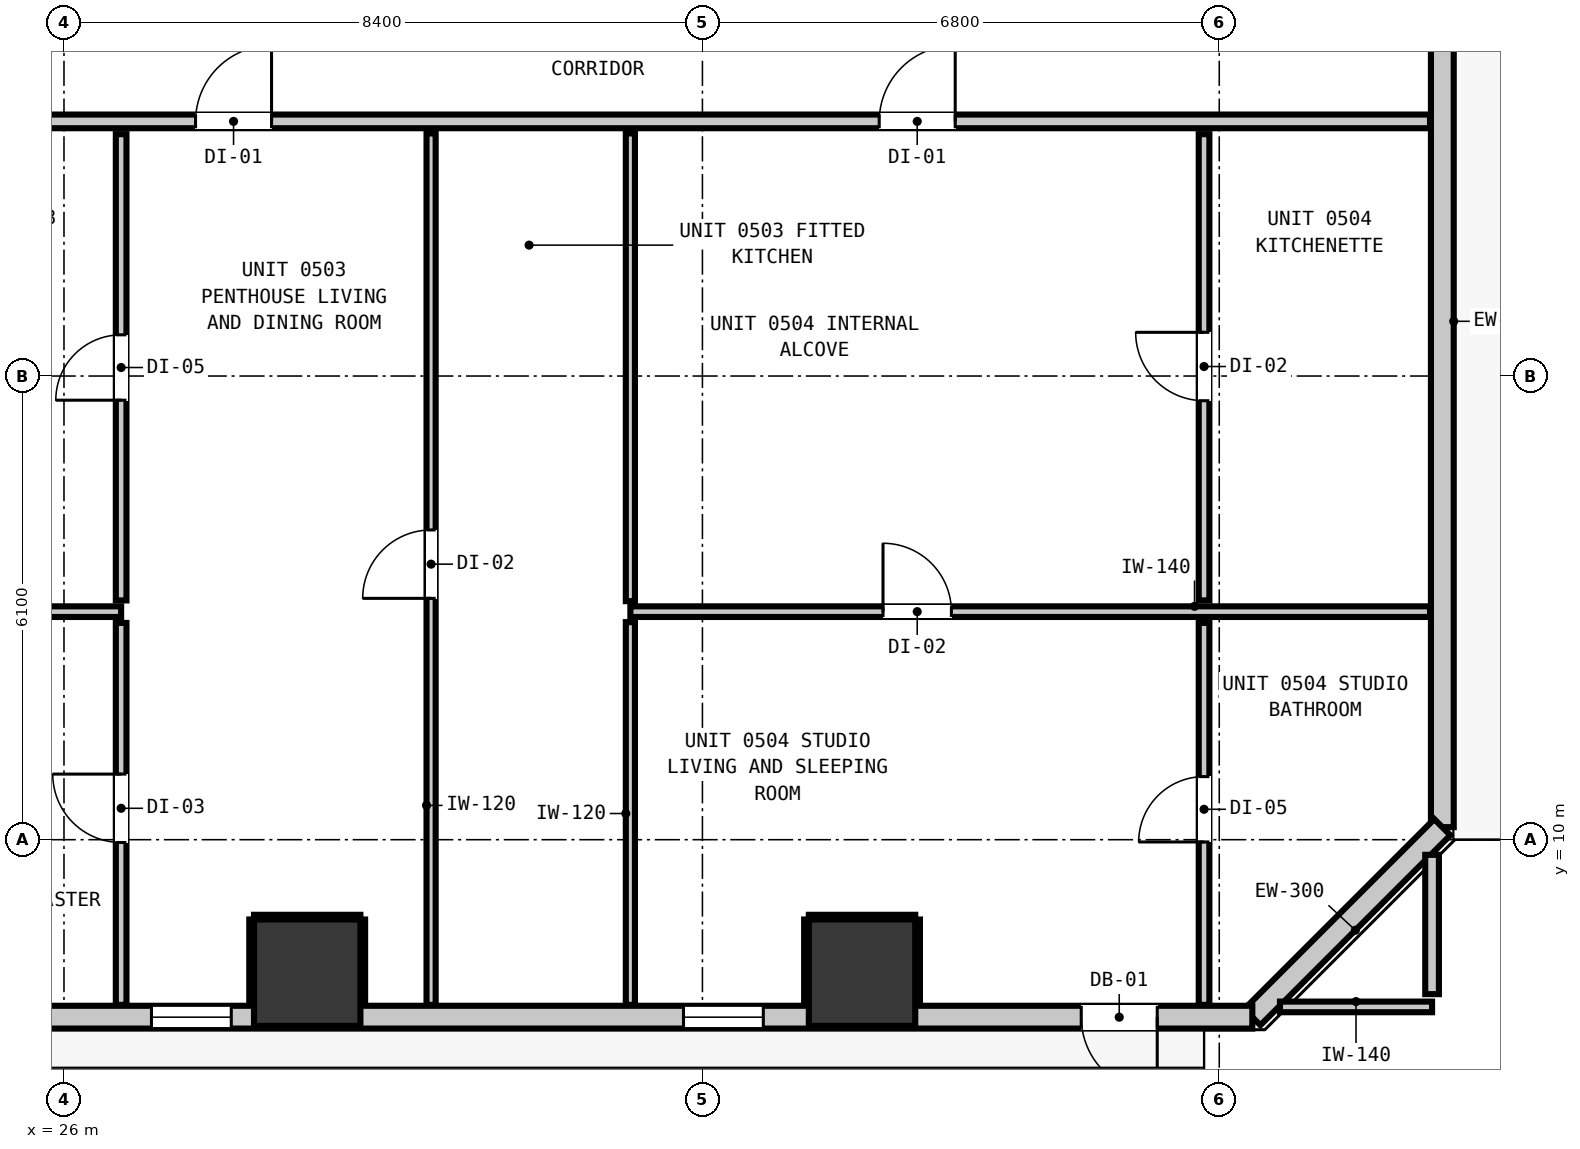
"""IFC4 building model, lengths in metres.
Left out: names, types, materials, properties, quantities, classifications, styles, units other than length and angle.
Written with IfcOpenShell. Run it as: python <this file> out.ifc"""

import sys

from ifc_helpers import new_model, si_unit, direction, frame, frame_2d, origin, origin_2d, place, context, subcontext, project, spatial, rectangle, extrude, element, fill, save


model = new_model("IFC4")
c1 = context("Model", 3, precision=1e-05, world=origin(), true_north=direction((0.0, 1.0)))
c2 = subcontext(c1, "Body", "Model", "MODEL_VIEW")
j1 = project(units=[si_unit("LENGTHUNIT", "METRE"), si_unit("PLANEANGLEUNIT", "RADIAN")], contexts=[c1])
p1 = place(None, origin())
s1 = spatial("IfcSite", under=j1, at=p1, CompositionType="ELEMENT")
p2 = place(p1, origin())
s2 = spatial("IfcBuilding", under=s1, at=p2, CompositionType="ELEMENT")
p3 = place(p2, frame((0.0, 0.0, 22.0)))
s3 = spatial("IfcBuildingStorey", under=s2, at=p3, CompositionType="ELEMENT", Elevation=22.0)
for number, where, z_axis, x_axis in (
    (1, (29.2, 8.25, -0.2), (0.0, 0.0, 1.0), (1.0, 0.0, 0.0)),
    (2, (36.5, 8.25, -0.2), (0.0, 0.0, 1.0), (1.0, 0.0, 0.0)),
):
    element("IfcColumn", number, at=place(p3, frame(where, z_axis=z_axis, x_axis=x_axis)), inside=s3, PredefinedType="COLUMN", context=c2, shape_type="SweptSolid", body=[
        extrude(rectangle(XDim=1.4, YDim=1.4, at=origin_2d()), origin(), (0.0, 0.0, 1.0), 3.52),
    ])
p4 = place(p3, frame((44.135, 44.835, 0.0), z_axis=(0.0, 0.0, 1.0), x_axis=(0.0, -1.0, 0.0)))
e3 = element("IfcWall", 3, at=p4, inside=s3, PredefinedType="STANDARD", context=c2, shape_type="SweptSolid", body=[
    extrude(rectangle(XDim=34.67, YDim=0.3, at=frame_2d((17.335, 0.0))), origin(), (0.0, 0.0, 1.0), 3.06),
])
p5 = place(p4, frame((0.501, 0.0, 0.0)))
e4 = element("IfcOpeningElement", 4, at=p5, cuts=e3, PredefinedType="OPENING", context=c2, shape_type="SweptSolid", body=[
    extrude(rectangle(XDim=1.1, YDim=2.15, at=frame_2d((0.55, 1.075))), frame((0.0, 0.16, 0.0), z_axis=(0.0, -1.0, 0.0), x_axis=(1.0, 0.0, 0.0)), (0.0, 0.0, 1.0), 0.32),
])
p6 = place(p4, frame((20.21, 0.0, 0.85)))
e5 = element("IfcOpeningElement", 5, at=p6, cuts=e3, PredefinedType="OPENING", context=c2, shape_type="SweptSolid", body=[
    extrude(rectangle(XDim=1.05, YDim=1.65, at=frame_2d((0.525, 0.825))), frame((0.0, 0.16, 0.0), z_axis=(0.0, -1.0, 0.0), x_axis=(1.0, 0.0, 0.0)), (0.0, 0.0, 1.0), 0.32),
])
p7 = place(p4, frame((7.426, 0.0, 0.85)))
e6 = element("IfcOpeningElement", 6, at=p7, cuts=e3, PredefinedType="OPENING", context=c2, shape_type="SweptSolid", body=[
    extrude(rectangle(XDim=1.05, YDim=1.65, at=frame_2d((0.525, 0.825))), frame((0.0, 0.16, 0.0), z_axis=(0.0, -1.0, 0.0), x_axis=(1.0, 0.0, 0.0)), (0.0, 0.0, 1.0), 0.32),
])
p8 = place(p3, frame((44.135, 10.165, 0.0), z_axis=(0.0, 0.0, 1.0), x_axis=(-0.707106781187, -0.707106781187, 0.0)))
e7 = element("IfcWall", 7, at=p8, inside=s3, PredefinedType="STANDARD", context=c2, shape_type="SweptSolid", body=[
    extrude(rectangle(XDim=3.536, YDim=0.3, at=frame_2d((1.768, 0.0))), origin(), (0.0, 0.0, 1.0), 3.06),
])
p9 = place(p3, frame((41.635, 7.665, 0.0), z_axis=(0.0, 0.0, 1.0), x_axis=(-1.0, 0.0, 0.0)))
e8 = element("IfcWall", 8, at=p9, inside=s3, PredefinedType="STANDARD", context=c2, shape_type="SweptSolid", body=[
    extrude(rectangle(XDim=37.47, YDim=0.3, at=frame_2d((18.735, 0.0))), origin(), (0.0, 0.0, 1.0), 3.06),
])
p10 = place(p9, frame((1.251, 0.0, 0.0)))
e9 = element("IfcOpeningElement", 9, at=p10, cuts=e8, PredefinedType="OPENING", context=c2, shape_type="SweptSolid", body=[
    extrude(rectangle(XDim=1.0, YDim=2.15, at=frame_2d((0.5, 1.075))), frame((0.0, 0.16, 0.0), z_axis=(0.0, -1.0, 0.0), x_axis=(1.0, 0.0, 0.0)), (0.0, 0.0, 1.0), 0.32),
])
p11 = place(p9, frame((32.31, 0.0, 0.85)))
e10 = element("IfcOpeningElement", 10, at=p11, cuts=e8, PredefinedType="OPENING", context=c2, shape_type="SweptSolid", body=[
    extrude(rectangle(XDim=1.05, YDim=1.65, at=frame_2d((0.525, 0.825))), frame((0.0, 0.16, 0.0), z_axis=(0.0, -1.0, 0.0), x_axis=(1.0, 0.0, 0.0)), (0.0, 0.0, 1.0), 0.32),
])
p12 = place(p9, frame((22.091, 0.0, 0.85)))
e11 = element("IfcOpeningElement", 11, at=p12, cuts=e8, PredefinedType="OPENING", context=c2, shape_type="SweptSolid", body=[
    extrude(rectangle(XDim=1.05, YDim=1.65, at=frame_2d((0.525, 0.825))), frame((0.0, 0.16, 0.0), z_axis=(0.0, -1.0, 0.0), x_axis=(1.0, 0.0, 0.0)), (0.0, 0.0, 1.0), 0.32),
])
p13 = place(p9, frame((24.666, 0.0, 0.85)))
e12 = element("IfcOpeningElement", 12, at=p13, cuts=e8, PredefinedType="OPENING", context=c2, shape_type="SweptSolid", body=[
    extrude(rectangle(XDim=1.05, YDim=1.65, at=frame_2d((0.525, 0.825))), frame((0.0, 0.16, 0.0), z_axis=(0.0, -1.0, 0.0), x_axis=(1.0, 0.0, 0.0)), (0.0, 0.0, 1.0), 0.32),
])
p14 = place(p9, frame((13.434, 0.0, 0.85)))
e13 = element("IfcOpeningElement", 13, at=p14, cuts=e8, PredefinedType="OPENING", context=c2, shape_type="SweptSolid", body=[
    extrude(rectangle(XDim=1.05, YDim=1.65, at=frame_2d((0.525, 0.825))), frame((0.0, 0.16, 0.0), z_axis=(0.0, -1.0, 0.0), x_axis=(1.0, 0.0, 0.0)), (0.0, 0.0, 1.0), 0.32),
])
p15 = place(p9, frame((15.863, 0.0, 0.85)))
e14 = element("IfcOpeningElement", 14, at=p15, cuts=e8, PredefinedType="OPENING", context=c2, shape_type="SweptSolid", body=[
    extrude(rectangle(XDim=1.05, YDim=1.65, at=frame_2d((0.525, 0.825))), frame((0.0, 0.16, 0.0), z_axis=(0.0, -1.0, 0.0), x_axis=(1.0, 0.0, 0.0)), (0.0, 0.0, 1.0), 0.32),
])
p16 = place(p9, frame((6.434, 0.0, 0.85)))
e15 = element("IfcOpeningElement", 15, at=p16, cuts=e8, PredefinedType="OPENING", context=c2, shape_type="SweptSolid", body=[
    extrude(rectangle(XDim=1.05, YDim=1.65, at=frame_2d((0.525, 0.825))), frame((0.0, 0.16, 0.0), z_axis=(0.0, -1.0, 0.0), x_axis=(1.0, 0.0, 0.0)), (0.0, 0.0, 1.0), 0.32),
])
p17 = place(p3, frame((1.827, 19.45, 0.0), z_axis=(0.0, 0.0, 1.0), x_axis=(1.0, 0.0, 0.0)))
e16 = element("IfcWall", 16, at=p17, inside=s3, PredefinedType="PARTITIONING", context=c2, shape_type="SweptSolid", body=[
    extrude(rectangle(XDim=42.146, YDim=0.18, at=frame_2d((21.073, 0.0))), origin(), (0.0, 0.0, 1.0), 3.06),
])
p18 = place(p17, frame((10.283, 0.0, 0.0)))
e17 = element("IfcOpeningElement", 17, at=p18, cuts=e16, PredefinedType="OPENING", context=c2, shape_type="SweptSolid", body=[
    extrude(rectangle(XDim=1.0, YDim=2.15, at=frame_2d((0.5, 1.075))), frame((0.0, 0.1, 0.0), z_axis=(0.0, -1.0, 0.0), x_axis=(1.0, 0.0, 0.0)), (0.0, 0.0, 1.0), 0.2),
])
p19 = place(p17, frame((17.402, 0.0, 0.0)))
e18 = element("IfcOpeningElement", 18, at=p19, cuts=e16, PredefinedType="OPENING", context=c2, shape_type="SweptSolid", body=[
    extrude(rectangle(XDim=1.0, YDim=2.15, at=frame_2d((0.5, 1.075))), frame((0.0, 0.1, 0.0), z_axis=(0.0, -1.0, 0.0), x_axis=(1.0, 0.0, 0.0)), (0.0, 0.0, 1.0), 0.2),
])
p20 = place(p17, frame((25.904, 0.0, 0.0)))
e19 = element("IfcOpeningElement", 19, at=p20, cuts=e16, PredefinedType="OPENING", context=c2, shape_type="SweptSolid", body=[
    extrude(rectangle(XDim=1.0, YDim=2.15, at=frame_2d((0.5, 1.075))), frame((0.0, 0.1, 0.0), z_axis=(0.0, -1.0, 0.0), x_axis=(1.0, 0.0, 0.0)), (0.0, 0.0, 1.0), 0.2),
])
p21 = place(p17, frame((34.899, 0.0, 0.0)))
e20 = element("IfcOpeningElement", 20, at=p21, cuts=e16, PredefinedType="OPENING", context=c2, shape_type="SweptSolid", body=[
    extrude(rectangle(XDim=1.0, YDim=2.15, at=frame_2d((0.5, 1.075))), frame((0.0, 0.1, 0.0), z_axis=(0.0, -1.0, 0.0), x_axis=(1.0, 0.0, 0.0)), (0.0, 0.0, 1.0), 0.2),
])
p22 = place(p3, frame((41.999, 7.8, 0.0), z_axis=(0.0, 0.0, 1.0), x_axis=(1.0, 0.0, 0.0)))
e21 = element("IfcWall", 21, at=p22, inside=s3, PredefinedType="PARTITIONING", context=c2, shape_type="SweptSolid", body=[
    extrude(rectangle(XDim=2.001, YDim=0.14, at=frame_2d((1.0, 0.0))), origin(), (0.0, 0.0, 1.0), 3.06),
])
p23 = place(p3, frame((23.742, 13.0, 0.0), z_axis=(0.0, 0.0, 1.0), x_axis=(1.0, 0.0, 0.0)))
e22 = element("IfcWall", 22, at=p23, inside=s3, PredefinedType="PARTITIONING", context=c2, shape_type="SweptSolid", body=[
    extrude(rectangle(XDim=3.01, YDim=0.14, at=frame_2d((1.505, 0.0))), origin(), (0.0, 0.0, 1.0), 3.06),
])
p24 = place(p3, frame((33.452, 13.0, 0.0), z_axis=(0.0, 0.0, 1.0), x_axis=(1.0, 0.0, 0.0)))
e23 = element("IfcWall", 23, at=p24, inside=s3, PredefinedType="PARTITIONING", context=c2, shape_type="SweptSolid", body=[
    extrude(rectangle(XDim=10.521, YDim=0.14, at=frame_2d((5.26, 0.0))), origin(), (0.0, 0.0, 1.0), 3.06),
])
p25 = place(p24, frame((3.324, 0.0, 0.0)))
e24 = element("IfcOpeningElement", 24, at=p25, cuts=e23, PredefinedType="OPENING", context=c2, shape_type="SweptSolid", body=[
    extrude(rectangle(XDim=0.9, YDim=2.1, at=frame_2d((0.45, 1.05))), frame((0.0, 0.08, 0.0), z_axis=(0.0, -1.0, 0.0), x_axis=(1.0, 0.0, 0.0)), (0.0, 0.0, 1.0), 0.16),
])
p26 = place(p3, frame((44.0, 7.968, 0.0), z_axis=(0.0, 0.0, 1.0), x_axis=(0.0, 1.0, 0.0)))
e25 = element("IfcWall", 25, at=p26, inside=s3, PredefinedType="PARTITIONING", context=c2, shape_type="SweptSolid", body=[
    extrude(rectangle(XDim=1.833, YDim=0.18, at=frame_2d((0.917, 0.0))), origin(), (0.0, 0.0, 1.0), 3.06),
])
p27 = place(p3, frame((26.752, 7.827, 0.0), z_axis=(0.0, 0.0, 1.0), x_axis=(0.0, 1.0, 0.0)))
e26 = element("IfcWall", 26, at=p27, inside=s3, PredefinedType="PARTITIONING", context=c2, shape_type="SweptSolid", body=[
    extrude(rectangle(XDim=5.025, YDim=0.14, at=frame_2d((2.513, 0.0))), origin(), (0.0, 0.0, 1.0), 3.06),
])
p28 = place(p27, frame((2.136, 0.0, 0.0)))
e27 = element("IfcOpeningElement", 27, at=p28, cuts=e26, PredefinedType="OPENING", context=c2, shape_type="SweptSolid", body=[
    extrude(rectangle(XDim=0.9, YDim=2.1, at=frame_2d((0.45, 1.05))), frame((0.0, 0.08, 0.0), z_axis=(0.0, -1.0, 0.0), x_axis=(1.0, 0.0, 0.0)), (0.0, 0.0, 1.0), 0.16),
])
p29 = place(p3, frame((26.752, 13.148, 0.0), z_axis=(0.0, 0.0, 1.0), x_axis=(0.0, 1.0, 0.0)))
e28 = element("IfcWall", 28, at=p29, inside=s3, PredefinedType="PARTITIONING", context=c2, shape_type="SweptSolid", body=[
    extrude(rectangle(XDim=6.134, YDim=0.14, at=frame_2d((3.067, 0.0))), origin(), (0.0, 0.0, 1.0), 3.06),
])
p30 = place(p29, frame((2.634, 0.0, 0.0)))
e29 = element("IfcOpeningElement", 29, at=p30, cuts=e28, PredefinedType="OPENING", context=c2, shape_type="SweptSolid", body=[
    extrude(rectangle(XDim=0.86, YDim=2.02, at=frame_2d((0.43, 1.01))), frame((0.0, 0.08, 0.0), z_axis=(0.0, -1.0, 0.0), x_axis=(1.0, 0.0, 0.0)), (0.0, 0.0, 1.0), 0.16),
])
p31 = place(p3, frame((41.0, 7.827, 0.0), z_axis=(0.0, 0.0, 1.0), x_axis=(0.0, 1.0, 0.0)))
e30 = element("IfcWall", 30, at=p31, inside=s3, PredefinedType="PARTITIONING", context=c2, shape_type="SweptSolid", body=[
    extrude(rectangle(XDim=5.025, YDim=0.14, at=frame_2d((2.513, 0.0))), origin(), (0.0, 0.0, 1.0), 3.06),
])
p32 = place(p31, frame((2.143, 0.0, 0.0)))
e31 = element("IfcOpeningElement", 31, at=p32, cuts=e30, PredefinedType="OPENING", context=c2, shape_type="SweptSolid", body=[
    extrude(rectangle(XDim=0.86, YDim=2.02, at=frame_2d((0.43, 1.01))), frame((0.0, 0.08, 0.0), z_axis=(0.0, -1.0, 0.0), x_axis=(1.0, 0.0, 0.0)), (0.0, 0.0, 1.0), 0.16),
])
p33 = place(p3, frame((41.0, 13.148, 0.0), z_axis=(0.0, 0.0, 1.0), x_axis=(0.0, 1.0, 0.0)))
e32 = element("IfcWall", 32, at=p33, inside=s3, PredefinedType="PARTITIONING", context=c2, shape_type="SweptSolid", body=[
    extrude(rectangle(XDim=6.134, YDim=0.14, at=frame_2d((3.067, 0.0))), origin(), (0.0, 0.0, 1.0), 2.445),
])
p34 = place(p33, frame((2.627, 0.0, 0.0)))
e33 = element("IfcOpeningElement", 33, at=p34, cuts=e32, PredefinedType="OPENING", context=c2, shape_type="SweptSolid", body=[
    extrude(rectangle(XDim=0.9, YDim=2.1, at=frame_2d((0.45, 1.05))), frame((0.0, 0.08, 0.0), z_axis=(0.0, -1.0, 0.0), x_axis=(1.0, 0.0, 0.0)), (0.0, 0.0, 1.0), 0.16),
])
p35 = place(p3, frame((30.83, 7.827, 0.0), z_axis=(0.0, 0.0, 1.0), x_axis=(0.0, 1.0, 0.0)))
e34 = element("IfcWall", 34, at=p35, inside=s3, PredefinedType="PARTITIONING", context=c2, shape_type="SweptSolid", body=[
    extrude(rectangle(XDim=11.465, YDim=0.12, at=frame_2d((5.732, 0.0))), origin(), (0.0, 0.0, 1.0), 3.06),
])
p36 = place(p35, frame((5.348, 0.0, 0.0)))
e35 = element("IfcOpeningElement", 35, at=p36, cuts=e34, PredefinedType="OPENING", context=c2, shape_type="SweptSolid", body=[
    extrude(rectangle(XDim=0.9, YDim=2.1, at=frame_2d((0.45, 1.05))), frame((0.0, 0.07, 0.0), z_axis=(0.0, -1.0, 0.0), x_axis=(1.0, 0.0, 0.0)), (0.0, 0.0, 1.0), 0.14),
])
p37 = place(p3, frame((33.452, 7.827, 0.0), z_axis=(0.0, 0.0, 1.0), x_axis=(0.0, 1.0, 0.0)))
e36 = element("IfcWall", 36, at=p37, inside=s3, PredefinedType="PARTITIONING", context=c2, shape_type="SweptSolid", body=[
    extrude(rectangle(XDim=5.035, YDim=0.12, at=frame_2d((2.518, 0.0))), origin(), (0.0, 0.0, 1.0), 3.06),
])
p38 = place(p3, frame((33.452, 13.138, 0.0), z_axis=(0.0, 0.0, 1.0), x_axis=(0.0, 1.0, 0.0)))
e37 = element("IfcWall", 37, at=p38, inside=s3, PredefinedType="PARTITIONING", context=c2, shape_type="SweptSolid", body=[
    extrude(rectangle(XDim=6.154, YDim=0.12, at=frame_2d((3.077, 0.0))), origin(), (0.0, 0.0, 1.0), 3.06),
])
p39 = place(p3, frame((28.5, 8.982, 0.0), z_axis=(0.0, 0.0, 1.0), x_axis=(1.0, 0.0, 0.0)))
e38 = element("IfcWall", 38, at=p39, inside=s3, PredefinedType="PARTITIONING", context=c2, shape_type="SweptSolid", body=[
    extrude(rectangle(XDim=1.4, YDim=0.06, at=frame_2d((0.7, 0.0))), origin(), (0.0, 0.0, 1.0), 1.45),
])
for number, where, z_axis, x_axis in (
    (39, (28.468, 7.83, 0.0), (0.0, 0.0, 1.0), (0.0, 1.0, 0.0)),
    (40, (29.932, 7.83, 0.0), (0.0, 0.0, 1.0), (0.0, 1.0, 0.0)),
):
    element("IfcWall", number, at=place(p3, frame(where, z_axis=z_axis, x_axis=x_axis)), inside=s3, PredefinedType="PARTITIONING", context=c2, shape_type="SweptSolid", body=[
        extrude(rectangle(XDim=1.12, YDim=0.06, at=frame_2d((0.56, 0.0))), origin(), (0.0, 0.0, 1.0), 1.45),
    ])
p40 = place(p3, frame((35.8, 8.982, 0.0), z_axis=(0.0, 0.0, 1.0), x_axis=(1.0, 0.0, 0.0)))
e41 = element("IfcWall", 41, at=p40, inside=s3, PredefinedType="PARTITIONING", context=c2, shape_type="SweptSolid", body=[
    extrude(rectangle(XDim=1.4, YDim=0.06, at=frame_2d((0.7, 0.0))), origin(), (0.0, 0.0, 1.0), 1.45),
])
for number, where, z_axis, x_axis in (
    (42, (35.768, 7.83, 0.0), (0.0, 0.0, 1.0), (0.0, 1.0, 0.0)),
    (43, (37.232, 7.83, 0.0), (0.0, 0.0, 1.0), (0.0, 1.0, 0.0)),
):
    element("IfcWall", number, at=place(p3, frame(where, z_axis=z_axis, x_axis=x_axis)), inside=s3, PredefinedType="PARTITIONING", context=c2, shape_type="SweptSolid", body=[
        extrude(rectangle(XDim=1.12, YDim=0.06, at=frame_2d((0.56, 0.0))), origin(), (0.0, 0.0, 1.0), 1.45),
    ])
p41 = place(p10, origin())
e44 = element("IfcDoor", 44, at=p41, inside=s3, OperationType="SINGLE_SWING_LEFT", PredefinedType="DOOR", context=c2, shape_type="SweptSolid", body=[
    extrude(rectangle(XDim=1.0, YDim=2.15, at=frame_2d((0.5, 1.075))), frame((0.0, 0.025, 0.0), z_axis=(0.0, -1.0, 0.0), x_axis=(1.0, 0.0, 0.0)), (0.0, 0.0, 1.0), 0.05),
])
fill(e9, e44)
p42 = place(p14, origin())
e45 = element("IfcWindow", 45, at=p42, inside=s3, PartitioningType="SINGLE_PANEL", PredefinedType="WINDOW", context=c2, shape_type="SweptSolid", body=[
    extrude(rectangle(XDim=1.05, YDim=1.65, at=frame_2d((0.525, 0.825))), frame((0.0, 0.03, 0.0), z_axis=(0.0, -1.0, 0.0), x_axis=(1.0, 0.0, 0.0)), (0.0, 0.0, 1.0), 0.06),
])
fill(e13, e45)
p43 = place(p16, origin())
e46 = element("IfcWindow", 46, at=p43, inside=s3, PartitioningType="SINGLE_PANEL", PredefinedType="WINDOW", context=c2, shape_type="SweptSolid", body=[
    extrude(rectangle(XDim=1.05, YDim=1.65, at=frame_2d((0.525, 0.825))), frame((0.0, 0.03, 0.0), z_axis=(0.0, -1.0, 0.0), x_axis=(1.0, 0.0, 0.0)), (0.0, 0.0, 1.0), 0.06),
])
fill(e15, e46)
p44 = place(p20, origin())
e47 = element("IfcDoor", 47, at=p44, inside=s3, OperationType="SINGLE_SWING_RIGHT", PredefinedType="DOOR", context=c2, shape_type="SweptSolid", body=[
    extrude(rectangle(XDim=1.0, YDim=2.15, at=frame_2d((0.5, 1.075))), frame((0.0, 0.025, 0.0), z_axis=(0.0, -1.0, 0.0), x_axis=(1.0, 0.0, 0.0)), (0.0, 0.0, 1.0), 0.05),
])
fill(e19, e47)
p45 = place(p30, origin())
e48 = element("IfcDoor", 48, at=p45, inside=s3, OperationType="SINGLE_SWING_LEFT", PredefinedType="DOOR", context=c2, shape_type="SweptSolid", body=[
    extrude(rectangle(XDim=0.86, YDim=2.02, at=frame_2d((0.43, 1.01))), frame((0.0, 0.025, 0.0), z_axis=(0.0, -1.0, 0.0), x_axis=(1.0, 0.0, 0.0)), (0.0, 0.0, 1.0), 0.05),
])
fill(e29, e48)
p46 = place(p28, origin())
e49 = element("IfcDoor", 49, at=p46, inside=s3, OperationType="SINGLE_SWING_RIGHT", PredefinedType="DOOR", context=c2, shape_type="SweptSolid", body=[
    extrude(rectangle(XDim=0.9, YDim=2.1, at=frame_2d((0.45, 1.05))), frame((0.0, 0.025, 0.0), z_axis=(0.0, -1.0, 0.0), x_axis=(1.0, 0.0, 0.0)), (0.0, 0.0, 1.0), 0.05),
])
fill(e27, e49)
p47 = place(p36, origin())
e50 = element("IfcDoor", 50, at=p47, inside=s3, OperationType="SINGLE_SWING_LEFT", PredefinedType="DOOR", context=c2, shape_type="SweptSolid", body=[
    extrude(rectangle(XDim=0.9, YDim=2.1, at=frame_2d((0.45, 1.05))), frame((0.0, 0.025, 0.0), z_axis=(0.0, -1.0, 0.0), x_axis=(1.0, 0.0, 0.0)), (0.0, 0.0, 1.0), 0.05),
])
fill(e35, e50)
p48 = place(p21, origin())
e51 = element("IfcDoor", 51, at=p48, inside=s3, OperationType="SINGLE_SWING_RIGHT", PredefinedType="DOOR", context=c2, shape_type="SweptSolid", body=[
    extrude(rectangle(XDim=1.0, YDim=2.15, at=frame_2d((0.5, 1.075))), frame((0.0, 0.025, 0.0), z_axis=(0.0, -1.0, 0.0), x_axis=(1.0, 0.0, 0.0)), (0.0, 0.0, 1.0), 0.05),
])
fill(e20, e51)
p49 = place(p25, origin())
e52 = element("IfcDoor", 52, at=p49, inside=s3, OperationType="SINGLE_SWING_LEFT", PredefinedType="DOOR", context=c2, shape_type="SweptSolid", body=[
    extrude(rectangle(XDim=0.9, YDim=2.1, at=frame_2d((0.45, 1.05))), frame((0.0, 0.025, 0.0), z_axis=(0.0, -1.0, 0.0), x_axis=(1.0, 0.0, 0.0)), (0.0, 0.0, 1.0), 0.05),
])
fill(e24, e52)
p50 = place(p34, origin())
e53 = element("IfcDoor", 53, at=p50, inside=s3, OperationType="SINGLE_SWING_RIGHT", PredefinedType="DOOR", context=c2, shape_type="SweptSolid", body=[
    extrude(rectangle(XDim=0.9, YDim=2.1, at=frame_2d((0.45, 1.05))), frame((0.0, 0.025, 0.0), z_axis=(0.0, -1.0, 0.0), x_axis=(1.0, 0.0, 0.0)), (0.0, 0.0, 1.0), 0.05),
])
fill(e33, e53)
p51 = place(p32, origin())
e54 = element("IfcDoor", 54, at=p51, inside=s3, OperationType="SINGLE_SWING_LEFT", PredefinedType="DOOR", context=c2, shape_type="SweptSolid", body=[
    extrude(rectangle(XDim=0.86, YDim=2.02, at=frame_2d((0.43, 1.01))), frame((0.0, 0.025, 0.0), z_axis=(0.0, -1.0, 0.0), x_axis=(1.0, 0.0, 0.0)), (0.0, 0.0, 1.0), 0.05),
])
fill(e31, e54)
save(model, sys.argv[1])
